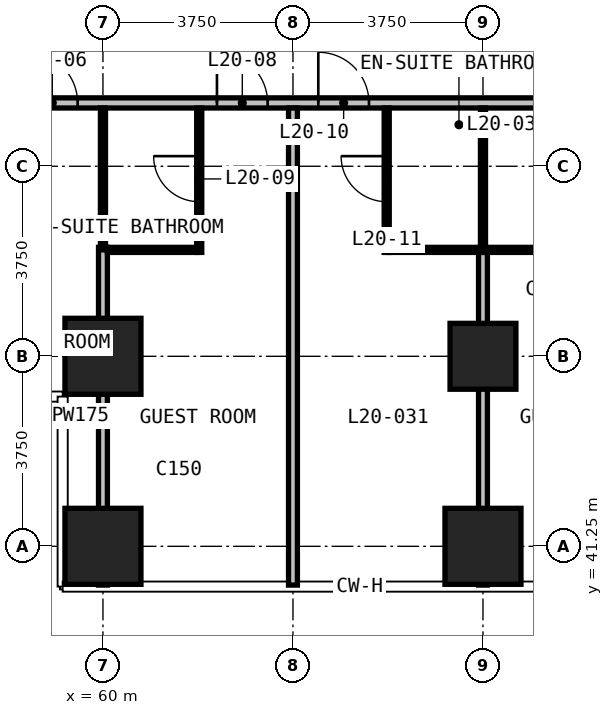
"""IFC4 building model, lengths in metres.
Left out: names, types, materials, properties, quantities, classifications, styles, units other than length and angle.
Written with IfcOpenShell. Run it as: python <this file> out.ifc"""

import sys

from ifc_helpers import new_model, si_unit, direction, frame, frame_2d, origin, origin_2d, place, context, subcontext, project, spatial, rectangle, extrude, element, fill, save


model = new_model("IFC4")
c1 = context("Model", 3, precision=1e-05, world=origin(), true_north=direction((0.0, 1.0)))
c2 = subcontext(c1, "Body", "Model", "MODEL_VIEW")
j1 = project(units=[si_unit("LENGTHUNIT", "METRE"), si_unit("PLANEANGLEUNIT", "RADIAN")], contexts=[c1])
p1 = place(None, origin())
s1 = spatial("IfcSite", under=j1, at=p1, CompositionType="ELEMENT")
p2 = place(p1, origin())
s2 = spatial("IfcBuilding", under=s1, at=p2, CompositionType="ELEMENT")
p3 = place(p2, frame((0.0, 0.0, 85.7)))
s3 = spatial("IfcBuildingStorey", under=s2, at=p3, CompositionType="ELEMENT", Elevation=85.7)
for number, where, z_axis, x_axis in (
    (1, (60.0, 41.25, 0.0), (0.0, 0.0, 1.0), (1.0, 0.0, 0.0)),
    (2, (60.0, 45.0, 0.0), (0.0, 0.0, 1.0), (1.0, 0.0, 0.0)),
    (3, (67.5, 41.25, 0.0), (0.0, 0.0, 1.0), (1.0, 0.0, 0.0)),
):
    element("IfcColumn", number, at=place(p3, frame(where, z_axis=z_axis, x_axis=x_axis)), inside=s3, PredefinedType="COLUMN", context=c2, shape_type="SweptSolid", body=[
        extrude(rectangle(XDim=1.5, YDim=1.5, at=origin_2d()), origin(), (0.0, 0.0, 1.0), 3.3),
    ])
p4 = place(p3, frame((67.5, 45.0, 0.0), z_axis=(0.0, 0.0, 1.0), x_axis=(1.0, 0.0, 0.0)))
e4 = element("IfcColumn", 4, at=p4, inside=s3, PredefinedType="COLUMN", context=c2, shape_type="SweptSolid", body=[
    extrude(rectangle(XDim=1.3, YDim=1.3, at=origin_2d()), origin(), (0.0, 0.0, 1.0), 3.3),
])
p5 = place(p3, frame((51.735, 50.0, 0.0), z_axis=(0.0, 0.0, 1.0), x_axis=(1.0, 0.0, 0.0)))
e5 = element("IfcWall", 5, at=p5, inside=s3, PredefinedType="PARTITIONING", context=c2, shape_type="SweptSolid", body=[
    extrude(rectangle(XDim=46.53, YDim=0.2, at=frame_2d((23.265, 0.0))), origin(), (0.0, 0.0, 1.0), 3.0),
])
p6 = place(p5, frame((6.765, 0.0, 0.0)))
e6 = element("IfcOpeningElement", 6, at=p6, cuts=e5, PredefinedType="OPENING", context=c2, shape_type="SweptSolid", body=[
    extrude(rectangle(XDim=1.0, YDim=2.2, at=frame_2d((0.5, 1.1))), frame((0.0, 0.11, 0.0), z_axis=(0.0, -1.0, 0.0), x_axis=(1.0, 0.0, 0.0)), (0.0, 0.0, 1.0), 0.22),
])
p7 = place(p5, frame((10.515, 0.0, 0.0)))
e7 = element("IfcOpeningElement", 7, at=p7, cuts=e5, PredefinedType="OPENING", context=c2, shape_type="SweptSolid", body=[
    extrude(rectangle(XDim=1.0, YDim=2.2, at=frame_2d((0.5, 1.1))), frame((0.0, 0.11, 0.0), z_axis=(0.0, -1.0, 0.0), x_axis=(1.0, 0.0, 0.0)), (0.0, 0.0, 1.0), 0.22),
])
p8 = place(p5, frame((12.515, 0.0, 0.0)))
e8 = element("IfcOpeningElement", 8, at=p8, cuts=e5, PredefinedType="OPENING", context=c2, shape_type="SweptSolid", body=[
    extrude(rectangle(XDim=1.0, YDim=2.2, at=frame_2d((0.5, 1.1))), frame((0.0, 0.11, 0.0), z_axis=(0.0, -1.0, 0.0), x_axis=(1.0, 0.0, 0.0)), (0.0, 0.0, 1.0), 0.22),
])
p9 = place(p5, frame((18.015, 0.0, 0.0)))
e9 = element("IfcOpeningElement", 9, at=p9, cuts=e5, PredefinedType="OPENING", context=c2, shape_type="SweptSolid", body=[
    extrude(rectangle(XDim=1.0, YDim=2.2, at=frame_2d((0.5, 1.1))), frame((0.0, 0.11, 0.0), z_axis=(0.0, -1.0, 0.0), x_axis=(1.0, 0.0, 0.0)), (0.0, 0.0, 1.0), 0.22),
])
p10 = place(p5, frame((20.015, 0.0, 0.0)))
e10 = element("IfcOpeningElement", 10, at=p10, cuts=e5, PredefinedType="OPENING", context=c2, shape_type="SweptSolid", body=[
    extrude(rectangle(XDim=1.0, YDim=2.2, at=frame_2d((0.5, 1.1))), frame((0.0, 0.11, 0.0), z_axis=(0.0, -1.0, 0.0), x_axis=(1.0, 0.0, 0.0)), (0.0, 0.0, 1.0), 0.22),
])
p11 = place(p5, frame((25.515, 0.0, 0.0)))
e11 = element("IfcOpeningElement", 11, at=p11, cuts=e5, PredefinedType="OPENING", context=c2, shape_type="SweptSolid", body=[
    extrude(rectangle(XDim=1.0, YDim=2.2, at=frame_2d((0.5, 1.1))), frame((0.0, 0.11, 0.0), z_axis=(0.0, -1.0, 0.0), x_axis=(1.0, 0.0, 0.0)), (0.0, 0.0, 1.0), 0.22),
])
p12 = place(p5, frame((27.515, 0.0, 0.0)))
e12 = element("IfcOpeningElement", 12, at=p12, cuts=e5, PredefinedType="OPENING", context=c2, shape_type="SweptSolid", body=[
    extrude(rectangle(XDim=1.0, YDim=2.2, at=frame_2d((0.5, 1.1))), frame((0.0, 0.11, 0.0), z_axis=(0.0, -1.0, 0.0), x_axis=(1.0, 0.0, 0.0)), (0.0, 0.0, 1.0), 0.22),
])
p13 = place(p5, frame((33.015, 0.0, 0.0)))
e13 = element("IfcOpeningElement", 13, at=p13, cuts=e5, PredefinedType="OPENING", context=c2, shape_type="SweptSolid", body=[
    extrude(rectangle(XDim=1.0, YDim=2.2, at=frame_2d((0.5, 1.1))), frame((0.0, 0.11, 0.0), z_axis=(0.0, -1.0, 0.0), x_axis=(1.0, 0.0, 0.0)), (0.0, 0.0, 1.0), 0.22),
])
p14 = place(p5, frame((35.015, 0.0, 0.0)))
e14 = element("IfcOpeningElement", 14, at=p14, cuts=e5, PredefinedType="OPENING", context=c2, shape_type="SweptSolid", body=[
    extrude(rectangle(XDim=1.0, YDim=2.2, at=frame_2d((0.5, 1.1))), frame((0.0, 0.11, 0.0), z_axis=(0.0, -1.0, 0.0), x_axis=(1.0, 0.0, 0.0)), (0.0, 0.0, 1.0), 0.22),
])
p15 = place(p5, frame((38.765, 0.0, 0.0)))
e15 = element("IfcOpeningElement", 15, at=p15, cuts=e5, PredefinedType="OPENING", context=c2, shape_type="SweptSolid", body=[
    extrude(rectangle(XDim=1.0, YDim=2.2, at=frame_2d((0.5, 1.1))), frame((0.0, 0.11, 0.0), z_axis=(0.0, -1.0, 0.0), x_axis=(1.0, 0.0, 0.0)), (0.0, 0.0, 1.0), 0.22),
])
p16 = place(p5, frame((1.8, 0.0, 0.0)))
e16 = element("IfcOpeningElement", 16, at=p16, cuts=e5, PredefinedType="OPENING", context=c2, shape_type="SweptSolid", body=[
    extrude(rectangle(XDim=0.9, YDim=2.2, at=frame_2d((0.45, 1.1))), frame((0.0, 0.11, 0.0), z_axis=(0.0, -1.0, 0.0), x_axis=(1.0, 0.0, 0.0)), (0.0, 0.0, 1.0), 0.22),
])
p17 = place(p5, frame((43.815, 0.0, 0.0)))
e17 = element("IfcOpeningElement", 17, at=p17, cuts=e5, PredefinedType="OPENING", context=c2, shape_type="SweptSolid", body=[
    extrude(rectangle(XDim=0.9, YDim=2.2, at=frame_2d((0.45, 1.1))), frame((0.0, 0.11, 0.0), z_axis=(0.0, -1.0, 0.0), x_axis=(1.0, 0.0, 0.0)), (0.0, 0.0, 1.0), 0.22),
])
p18 = place(p3, frame((60.0, 40.485, 0.0), z_axis=(0.0, 0.0, 1.0), x_axis=(0.0, 1.0, 0.0)))
e18 = element("IfcWall", 18, at=p18, inside=s3, PredefinedType="PARTITIONING", context=c2, shape_type="SweptSolid", body=[
    extrude(rectangle(XDim=6.665, YDim=0.175, at=frame_2d((3.333, 0.0))), origin(), (0.0, 0.0, 1.0), 3.0),
])
p19 = place(p3, frame((63.75, 40.485, 0.0), z_axis=(0.0, 0.0, 1.0), x_axis=(0.0, 1.0, 0.0)))
e19 = element("IfcWall", 19, at=p19, inside=s3, PredefinedType="PARTITIONING", context=c2, shape_type="SweptSolid", body=[
    extrude(rectangle(XDim=9.415, YDim=0.175, at=frame_2d((4.708, 0.0))), origin(), (0.0, 0.0, 1.0), 3.0),
])
p20 = place(p3, frame((67.5, 40.485, 0.0), z_axis=(0.0, 0.0, 1.0), x_axis=(0.0, 1.0, 0.0)))
e20 = element("IfcWall", 20, at=p20, inside=s3, PredefinedType="PARTITIONING", context=c2, shape_type="SweptSolid", body=[
    extrude(rectangle(XDim=6.565, YDim=0.175, at=frame_2d((3.282, 0.0))), origin(), (0.0, 0.0, 1.0), 3.0),
])
p21 = place(p3, frame((60.088, 47.1, 0.0), z_axis=(0.0, 0.0, 1.0), x_axis=(1.0, 0.0, 0.0)))
e21 = element("IfcWall", 21, at=p21, inside=s3, PredefinedType="PARTITIONING", context=c2, shape_type="SweptSolid", body=[
    extrude(rectangle(XDim=1.762, YDim=0.1, at=frame_2d((0.881, 0.0))), origin(), (0.0, 0.0, 1.0), 3.0),
])
p22 = place(p3, frame((65.65, 47.1, 0.0), z_axis=(0.0, 0.0, 1.0), x_axis=(1.0, 0.0, 0.0)))
e22 = element("IfcWall", 22, at=p22, inside=s3, PredefinedType="PARTITIONING", context=c2, shape_type="SweptSolid", body=[
    extrude(rectangle(XDim=3.7, YDim=0.1, at=frame_2d((1.85, 0.0))), origin(), (0.0, 0.0, 1.0), 3.0),
])
p23 = place(p3, frame((60.0, 47.1, 0.0), z_axis=(0.0, 0.0, 1.0), x_axis=(0.0, 1.0, 0.0)))
e23 = element("IfcWall", 23, at=p23, inside=s3, PredefinedType="PARTITIONING", context=c2, shape_type="SweptSolid", body=[
    extrude(rectangle(XDim=2.8, YDim=0.1, at=frame_2d((1.4, 0.0))), origin(), (0.0, 0.0, 1.0), 3.0),
])
p24 = place(p3, frame((61.9, 47.05, 0.0), z_axis=(0.0, 0.0, 1.0), x_axis=(0.0, 1.0, 0.0)))
e24 = element("IfcWall", 24, at=p24, inside=s3, PredefinedType="PARTITIONING", context=c2, shape_type="SweptSolid", body=[
    extrude(rectangle(XDim=2.85, YDim=0.1, at=frame_2d((1.425, 0.0))), origin(), (0.0, 0.0, 1.0), 3.0),
])
p25 = place(p24, frame((1.0, 0.0, 0.0)))
e25 = element("IfcOpeningElement", 25, at=p25, cuts=e24, PredefinedType="OPENING", context=c2, shape_type="SweptSolid", body=[
    extrude(rectangle(XDim=0.9, YDim=2.2, at=frame_2d((0.45, 1.1))), frame((0.0, 0.06, 0.0), z_axis=(0.0, -1.0, 0.0), x_axis=(1.0, 0.0, 0.0)), (0.0, 0.0, 1.0), 0.12),
])
p26 = place(p3, frame((65.6, 47.05, 0.0), z_axis=(0.0, 0.0, 1.0), x_axis=(0.0, 1.0, 0.0)))
e26 = element("IfcWall", 26, at=p26, inside=s3, PredefinedType="PARTITIONING", context=c2, shape_type="SweptSolid", body=[
    extrude(rectangle(XDim=2.85, YDim=0.1, at=frame_2d((1.425, 0.0))), origin(), (0.0, 0.0, 1.0), 3.0),
])
p27 = place(p26, frame((1.0, 0.0, 0.0)))
e27 = element("IfcOpeningElement", 27, at=p27, cuts=e26, PredefinedType="OPENING", context=c2, shape_type="SweptSolid", body=[
    extrude(rectangle(XDim=0.9, YDim=2.2, at=frame_2d((0.45, 1.1))), frame((0.0, 0.06, 0.0), z_axis=(0.0, -1.0, 0.0), x_axis=(1.0, 0.0, 0.0)), (0.0, 0.0, 1.0), 0.12),
])
p28 = place(p3, frame((67.5, 47.15, 0.0), z_axis=(0.0, 0.0, 1.0), x_axis=(0.0, 1.0, 0.0)))
e28 = element("IfcWall", 28, at=p28, inside=s3, PredefinedType="PARTITIONING", context=c2, shape_type="SweptSolid", body=[
    extrude(rectangle(XDim=2.75, YDim=0.1, at=frame_2d((1.375, 0.0))), origin(), (0.0, 0.0, 1.0), 3.0),
])
p29 = place(p6, origin())
e29 = element("IfcDoor", 29, at=p29, inside=s3, OperationType="SINGLE_SWING_LEFT", PredefinedType="DOOR", context=c2, shape_type="SweptSolid", body=[
    extrude(rectangle(XDim=1.0, YDim=2.2, at=frame_2d((0.5, 1.1))), frame((0.0, 0.025, 0.0), z_axis=(0.0, -1.0, 0.0), x_axis=(1.0, 0.0, 0.0)), (0.0, 0.0, 1.0), 0.05),
])
fill(e6, e29)
p30 = place(p7, origin())
e30 = element("IfcDoor", 30, at=p30, inside=s3, OperationType="SINGLE_SWING_RIGHT", PredefinedType="DOOR", context=c2, shape_type="SweptSolid", body=[
    extrude(rectangle(XDim=1.0, YDim=2.2, at=frame_2d((0.5, 1.1))), frame((0.0, 0.025, 0.0), z_axis=(0.0, -1.0, 0.0), x_axis=(1.0, 0.0, 0.0)), (0.0, 0.0, 1.0), 0.05),
])
fill(e7, e30)
p31 = place(p25, origin())
e31 = element("IfcDoor", 31, at=p31, inside=s3, OperationType="SINGLE_SWING_RIGHT", PredefinedType="DOOR", context=c2, shape_type="SweptSolid", body=[
    extrude(rectangle(XDim=0.9, YDim=2.2, at=frame_2d((0.45, 1.1))), frame((0.0, 0.025, 0.0), z_axis=(0.0, -1.0, 0.0), x_axis=(1.0, 0.0, 0.0)), (0.0, 0.0, 1.0), 0.05),
])
fill(e25, e31)
p32 = place(p8, origin())
e32 = element("IfcDoor", 32, at=p32, inside=s3, OperationType="SINGLE_SWING_LEFT", PredefinedType="DOOR", context=c2, shape_type="SweptSolid", body=[
    extrude(rectangle(XDim=1.0, YDim=2.2, at=frame_2d((0.5, 1.1))), frame((0.0, 0.025, 0.0), z_axis=(0.0, -1.0, 0.0), x_axis=(1.0, 0.0, 0.0)), (0.0, 0.0, 1.0), 0.05),
])
fill(e8, e32)
p33 = place(p27, origin())
e33 = element("IfcDoor", 33, at=p33, inside=s3, OperationType="SINGLE_SWING_RIGHT", PredefinedType="DOOR", context=c2, shape_type="SweptSolid", body=[
    extrude(rectangle(XDim=0.9, YDim=2.2, at=frame_2d((0.45, 1.1))), frame((0.0, 0.025, 0.0), z_axis=(0.0, -1.0, 0.0), x_axis=(1.0, 0.0, 0.0)), (0.0, 0.0, 1.0), 0.05),
])
fill(e27, e33)
save(model, sys.argv[1])
